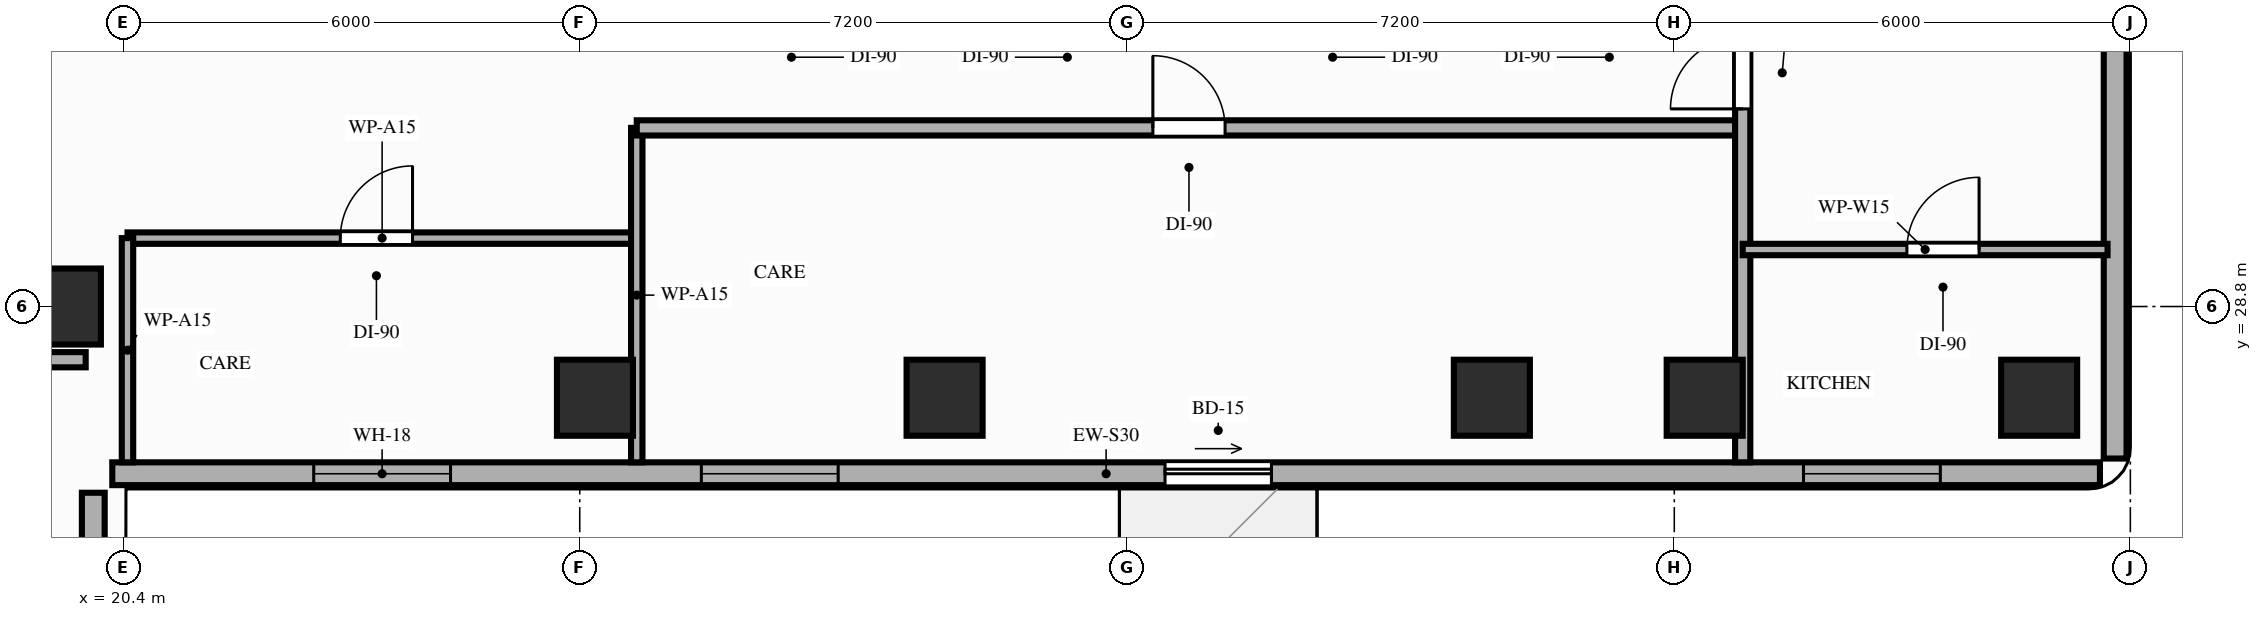
"""IFC4 building model, lengths in metres.
Left out: names, types, materials, properties, quantities, classifications, styles, units other than length and angle.
Written with IfcOpenShell. Run it as: python <this file> out.ifc"""

import sys

from ifc_helpers import new_model, si_unit, direction, frame, frame_2d, origin, origin_2d, place, context, subcontext, project, spatial, rectangle, extrude, element, fill, save


model = new_model("IFC4")
c1 = context("Model", 3, precision=1e-05, world=origin(), true_north=direction((0.0, 1.0)))
c2 = subcontext(c1, "Body", "Model", "MODEL_VIEW")
j1 = project(units=[si_unit("LENGTHUNIT", "METRE"), si_unit("PLANEANGLEUNIT", "RADIAN")], contexts=[c1])
p1 = place(None, origin())
s1 = spatial("IfcSite", under=j1, at=p1, CompositionType="ELEMENT")
p2 = place(p1, origin())
s2 = spatial("IfcBuilding", under=s1, at=p2, CompositionType="ELEMENT")
p3 = place(p2, frame((0.0, 0.0, 113.8)))
s3 = spatial("IfcBuildingStorey", under=s2, at=p3, CompositionType="ELEMENT", Elevation=113.8)
for number, where, z_axis, x_axis in (
    (1, (19.6, 28.8, 0.0), (0.0, 0.0, 1.0), (1.0, 0.0, 0.0)),
    (2, (26.6, 27.6, 0.0), (0.0, 0.0, 1.0), (1.0, 0.0, 0.0)),
    (3, (31.2, 27.6, 0.0), (0.0, 0.0, 1.0), (1.0, 0.0, 0.0)),
    (4, (38.4, 27.6, 0.0), (0.0, 0.0, 1.0), (1.0, 0.0, 0.0)),
    (5, (41.2, 27.6, 0.0), (0.0, 0.0, 1.0), (1.0, 0.0, 0.0)),
    (6, (45.6, 27.6, 0.0), (0.0, 0.0, 1.0), (1.0, 0.0, 0.0)),
):
    element("IfcColumn", number, at=place(p3, frame(where, z_axis=z_axis, x_axis=x_axis)), inside=s3, PredefinedType="COLUMN", context=c2, shape_type="SweptSolid", body=[
        extrude(rectangle(XDim=1.0, YDim=1.0, at=origin_2d()), origin(), (0.0, 0.0, 1.0), 3.2),
    ])
p4 = place(p3, frame((20.0, 8.8, 0.0), z_axis=(0.0, 0.0, 1.0), x_axis=(0.0, 1.0, 0.0)))
e7 = element("IfcWall", 7, at=p4, inside=s3, PredefinedType="STANDARD", context=c2, shape_type="SweptSolid", body=[
    extrude(rectangle(XDim=17.55, YDim=0.3, at=frame_2d((8.775, 0.0))), origin(), (0.0, 0.0, 1.0), 2.4),
])
p5 = place(p4, frame((10.11, 0.0, 0.85)))
e8 = element("IfcOpeningElement", 8, at=p5, cuts=e7, PredefinedType="OPENING", context=c2, shape_type="SweptSolid", body=[
    extrude(rectangle(XDim=1.8, YDim=1.3, at=frame_2d((0.9, 0.65))), frame((0.0, 0.16, 0.0), z_axis=(0.0, -1.0, 0.0), x_axis=(1.0, 0.0, 0.0)), (0.0, 0.0, 1.0), 0.32),
])
p6 = place(p4, frame((5.95, 0.0, 0.85)))
e9 = element("IfcOpeningElement", 9, at=p6, cuts=e7, PredefinedType="OPENING", context=c2, shape_type="SweptSolid", body=[
    extrude(rectangle(XDim=1.1, YDim=1.3, at=frame_2d((0.55, 0.65))), frame((0.0, 0.16, 0.0), z_axis=(0.0, -1.0, 0.0), x_axis=(1.0, 0.0, 0.0)), (0.0, 0.0, 1.0), 0.32),
])
p7 = place(p3, frame((20.25, 26.6, 0.0), z_axis=(0.0, 0.0, 1.0), x_axis=(1.0, 0.0, 0.0)))
e10 = element("IfcWall", 10, at=p7, inside=s3, PredefinedType="STANDARD", context=c2, shape_type="SweptSolid", body=[
    extrude(rectangle(XDim=26.15, YDim=0.3, at=frame_2d((13.075, 0.0))), origin(), (0.0, 0.0, 1.0), 2.7),
])
p8 = place(p7, frame((13.85, 0.0, 0.0)))
e11 = element("IfcOpeningElement", 11, at=p8, cuts=e10, PredefinedType="OPENING", context=c2, shape_type="SweptSolid", body=[
    extrude(rectangle(XDim=1.4, YDim=2.1, at=frame_2d((0.7, 1.05))), frame((0.0, 0.16, 0.0), z_axis=(0.0, -1.0, 0.0), x_axis=(1.0, 0.0, 0.0)), (0.0, 0.0, 1.0), 0.32),
])
p9 = place(p7, frame((2.65, 0.0, 0.85)))
e12 = element("IfcOpeningElement", 12, at=p9, cuts=e10, PredefinedType="OPENING", context=c2, shape_type="SweptSolid", body=[
    extrude(rectangle(XDim=1.8, YDim=1.6, at=frame_2d((0.9, 0.8))), frame((0.0, 0.16, 0.0), z_axis=(0.0, -1.0, 0.0), x_axis=(1.0, 0.0, 0.0)), (0.0, 0.0, 1.0), 0.32),
])
p10 = place(p7, frame((7.75, 0.0, 0.85)))
e13 = element("IfcOpeningElement", 13, at=p10, cuts=e10, PredefinedType="OPENING", context=c2, shape_type="SweptSolid", body=[
    extrude(rectangle(XDim=1.8, YDim=1.6, at=frame_2d((0.9, 0.8))), frame((0.0, 0.16, 0.0), z_axis=(0.0, -1.0, 0.0), x_axis=(1.0, 0.0, 0.0)), (0.0, 0.0, 1.0), 0.32),
])
p11 = place(p7, frame((22.25, 0.0, 0.85)))
e14 = element("IfcOpeningElement", 14, at=p11, cuts=e10, PredefinedType="OPENING", context=c2, shape_type="SweptSolid", body=[
    extrude(rectangle(XDim=1.8, YDim=1.6, at=frame_2d((0.9, 0.8))), frame((0.0, 0.16, 0.0), z_axis=(0.0, -1.0, 0.0), x_axis=(1.0, 0.0, 0.0)), (0.0, 0.0, 1.0), 0.32),
])
p12 = place(p3, frame((46.6, 26.8, 0.0), z_axis=(0.0, 0.0, 1.0), x_axis=(0.0, 1.0, 0.0)))
e15 = element("IfcWall", 15, at=p12, inside=s3, PredefinedType="STANDARD", context=c2, shape_type="SweptSolid", body=[
    extrude(rectangle(XDim=15.35, YDim=0.3, at=frame_2d((7.675, 0.0))), origin(), (0.0, 0.0, 1.0), 3.02),
])
p13 = place(p12, frame((5.45, 0.0, 0.85)))
e16 = element("IfcOpeningElement", 16, at=p13, cuts=e15, PredefinedType="OPENING", context=c2, shape_type="SweptSolid", body=[
    extrude(rectangle(XDim=1.8, YDim=1.75, at=frame_2d((0.9, 0.875))), frame((0.0, 0.16, 0.0), z_axis=(0.0, -1.0, 0.0), x_axis=(1.0, 0.0, 0.0)), (0.0, 0.0, 1.0), 0.32),
])
p14 = place(p12, frame((11.68, 0.0, 0.85)))
e17 = element("IfcOpeningElement", 17, at=p14, cuts=e15, PredefinedType="OPENING", context=c2, shape_type="SweptSolid", body=[
    extrude(rectangle(XDim=1.8, YDim=1.75, at=frame_2d((0.9, 0.875))), frame((0.0, 0.16, 0.0), z_axis=(0.0, -1.0, 0.0), x_axis=(1.0, 0.0, 0.0)), (0.0, 0.0, 1.0), 0.32),
])
p15 = place(p3, frame((9.06, 28.1, 0.0), z_axis=(0.0, 0.0, 1.0), x_axis=(1.0, 0.0, 0.0)))
e18 = element("IfcWall", 18, at=p15, inside=s3, PredefinedType="PARTITIONING", context=c2, shape_type="SweptSolid", body=[
    extrude(rectangle(XDim=10.84, YDim=0.2, at=frame_2d((5.42, 0.0))), origin(), (0.0, 0.0, 1.0), 2.4),
])
p16 = place(p3, frame((20.45, 29.7, 0.0), z_axis=(0.0, 0.0, 1.0), x_axis=(1.0, 0.0, 0.0)))
e19 = element("IfcWall", 19, at=p16, inside=s3, PredefinedType="PARTITIONING", context=c2, shape_type="SweptSolid", body=[
    extrude(rectangle(XDim=6.7, YDim=0.15, at=frame_2d((3.35, 0.0))), origin(), (0.0, 0.0, 1.0), 3.02),
])
p17 = place(p16, frame((2.8, 0.0, 0.0)))
e20 = element("IfcOpeningElement", 20, at=p17, cuts=e19, PredefinedType="OPENING", context=c2, shape_type="SweptSolid", body=[
    extrude(rectangle(XDim=0.95, YDim=2.15, at=frame_2d((0.475, 1.075))), frame((0.0, 0.085, 0.0), z_axis=(0.0, -1.0, 0.0), x_axis=(1.0, 0.0, 0.0)), (0.0, 0.0, 1.0), 0.17),
])
p18 = place(p3, frame((20.45, 26.75, 0.0), z_axis=(0.0, 0.0, 1.0), x_axis=(0.0, 1.0, 0.0)))
e21 = element("IfcWall", 21, at=p18, inside=s3, PredefinedType="PARTITIONING", context=c2, shape_type="SweptSolid", body=[
    extrude(rectangle(XDim=2.95, YDim=0.15, at=frame_2d((1.475, 0.0))), origin(), (0.0, 0.0, 1.0), 2.4),
])
p19 = place(p3, frame((27.15, 26.75, 0.0), z_axis=(0.0, 0.0, 1.0), x_axis=(0.0, 1.0, 0.0)))
e22 = element("IfcWall", 22, at=p19, inside=s3, PredefinedType="PARTITIONING", context=c2, shape_type="SweptSolid", body=[
    extrude(rectangle(XDim=4.4, YDim=0.15, at=frame_2d((2.2, 0.0))), origin(), (0.0, 0.0, 1.0), 2.4),
])
p20 = place(p3, frame((27.15, 31.15, 0.0), z_axis=(0.0, 0.0, 1.0), x_axis=(1.0, 0.0, 0.0)))
e23 = element("IfcWall", 23, at=p20, inside=s3, PredefinedType="PARTITIONING", context=c2, shape_type="SweptSolid", body=[
    extrude(rectangle(XDim=14.55, YDim=0.2, at=frame_2d((7.275, 0.0))), origin(), (0.0, 0.0, 1.0), 2.4),
])
p21 = place(p20, frame((6.79, 0.0, 0.0)))
e24 = element("IfcOpeningElement", 24, at=p21, cuts=e23, PredefinedType="OPENING", context=c2, shape_type="SweptSolid", body=[
    extrude(rectangle(XDim=0.95, YDim=2.15, at=frame_2d((0.475, 1.075))), frame((0.0, 0.11, 0.0), z_axis=(0.0, -1.0, 0.0), x_axis=(1.0, 0.0, 0.0)), (0.0, 0.0, 1.0), 0.22),
])
p22 = place(p3, frame((41.7, 26.75, 0.0), z_axis=(0.0, 0.0, 1.0), x_axis=(0.0, 1.0, 0.0)))
e25 = element("IfcWall", 25, at=p22, inside=s3, PredefinedType="PARTITIONING", context=c2, shape_type="SweptSolid", body=[
    extrude(rectangle(XDim=15.45, YDim=0.2, at=frame_2d((7.725, 0.0))), origin(), (0.0, 0.0, 1.0), 2.4),
])
p23 = place(p22, frame((4.65, 0.0, 0.0)))
e26 = element("IfcOpeningElement", 26, at=p23, cuts=e25, PredefinedType="OPENING", context=c2, shape_type="SweptSolid", body=[
    extrude(rectangle(XDim=0.95, YDim=2.15, at=frame_2d((0.475, 1.075))), frame((0.0, 0.11, 0.0), z_axis=(0.0, -1.0, 0.0), x_axis=(1.0, 0.0, 0.0)), (0.0, 0.0, 1.0), 0.22),
])
p24 = place(p3, frame((41.7, 29.55, 0.0), z_axis=(0.0, 0.0, 1.0), x_axis=(1.0, 0.0, 0.0)))
e27 = element("IfcWall", 27, at=p24, inside=s3, PredefinedType="PARTITIONING", context=c2, shape_type="SweptSolid", body=[
    extrude(rectangle(XDim=4.8, YDim=0.15, at=frame_2d((2.4, 0.0))), origin(), (0.0, 0.0, 1.0), 2.4),
])
p25 = place(p24, frame((2.16, 0.0, 0.0)))
e28 = element("IfcOpeningElement", 28, at=p25, cuts=e27, PredefinedType="OPENING", context=c2, shape_type="SweptSolid", body=[
    extrude(rectangle(XDim=0.95, YDim=2.15, at=frame_2d((0.475, 1.075))), frame((0.0, 0.085, 0.0), z_axis=(0.0, -1.0, 0.0), x_axis=(1.0, 0.0, 0.0)), (0.0, 0.0, 1.0), 0.17),
])
p26 = place(p8, origin())
e29 = element("IfcDoor", 29, at=p26, inside=s3, OperationType="SLIDING_TO_RIGHT", PredefinedType="DOOR", context=c2, shape_type="SweptSolid", body=[
    extrude(rectangle(XDim=1.4, YDim=2.1, at=frame_2d((0.7, 1.05))), frame((0.0, 0.025, 0.0), z_axis=(0.0, -1.0, 0.0), x_axis=(1.0, 0.0, 0.0)), (0.0, 0.0, 1.0), 0.05),
])
fill(e11, e29)
p27 = place(p9, origin())
e30 = element("IfcWindow", 30, at=p27, inside=s3, PartitioningType="SINGLE_PANEL", PredefinedType="WINDOW", context=c2, shape_type="SweptSolid", body=[
    extrude(rectangle(XDim=1.8, YDim=1.6, at=frame_2d((0.9, 0.8))), frame((0.0, 0.03, 0.0), z_axis=(0.0, -1.0, 0.0), x_axis=(1.0, 0.0, 0.0)), (0.0, 0.0, 1.0), 0.06),
])
fill(e12, e30)
p28 = place(p10, origin())
e31 = element("IfcWindow", 31, at=p28, inside=s3, PartitioningType="SINGLE_PANEL", PredefinedType="WINDOW", context=c2, shape_type="SweptSolid", body=[
    extrude(rectangle(XDim=1.8, YDim=1.6, at=frame_2d((0.9, 0.8))), frame((0.0, 0.03, 0.0), z_axis=(0.0, -1.0, 0.0), x_axis=(1.0, 0.0, 0.0)), (0.0, 0.0, 1.0), 0.06),
])
fill(e13, e31)
p29 = place(p11, origin())
e32 = element("IfcWindow", 32, at=p29, inside=s3, PartitioningType="SINGLE_PANEL", PredefinedType="WINDOW", context=c2, shape_type="SweptSolid", body=[
    extrude(rectangle(XDim=1.8, YDim=1.6, at=frame_2d((0.9, 0.8))), frame((0.0, 0.03, 0.0), z_axis=(0.0, -1.0, 0.0), x_axis=(1.0, 0.0, 0.0)), (0.0, 0.0, 1.0), 0.06),
])
fill(e14, e32)
p30 = place(p17, origin())
e33 = element("IfcDoor", 33, at=p30, inside=s3, OperationType="SINGLE_SWING_RIGHT", PredefinedType="DOOR", context=c2, shape_type="SweptSolid", body=[
    extrude(rectangle(XDim=0.95, YDim=2.15, at=frame_2d((0.475, 1.075))), frame((0.0, 0.025, 0.0), z_axis=(0.0, -1.0, 0.0), x_axis=(1.0, 0.0, 0.0)), (0.0, 0.0, 1.0), 0.05),
])
fill(e20, e33)
p31 = place(p23, origin())
e34 = element("IfcDoor", 34, at=p31, inside=s3, OperationType="SINGLE_SWING_LEFT", PredefinedType="DOOR", context=c2, shape_type="SweptSolid", body=[
    extrude(rectangle(XDim=0.95, YDim=2.15, at=frame_2d((0.475, 1.075))), frame((0.0, 0.025, 0.0), z_axis=(0.0, -1.0, 0.0), x_axis=(1.0, 0.0, 0.0)), (0.0, 0.0, 1.0), 0.05),
])
fill(e26, e34)
p32 = place(p25, origin())
e35 = element("IfcDoor", 35, at=p32, inside=s3, OperationType="SINGLE_SWING_RIGHT", PredefinedType="DOOR", context=c2, shape_type="SweptSolid", body=[
    extrude(rectangle(XDim=0.95, YDim=2.15, at=frame_2d((0.475, 1.075))), frame((0.0, 0.025, 0.0), z_axis=(0.0, -1.0, 0.0), x_axis=(1.0, 0.0, 0.0)), (0.0, 0.0, 1.0), 0.05),
])
fill(e28, e35)
p33 = place(p21, origin())
e36 = element("IfcDoor", 36, at=p33, inside=s3, OperationType="SINGLE_SWING_LEFT", PredefinedType="DOOR", context=c2, shape_type="SweptSolid", body=[
    extrude(rectangle(XDim=0.95, YDim=2.15, at=frame_2d((0.475, 1.075))), frame((0.0, 0.025, 0.0), z_axis=(0.0, -1.0, 0.0), x_axis=(1.0, 0.0, 0.0)), (0.0, 0.0, 1.0), 0.05),
])
fill(e24, e36)
save(model, sys.argv[1])
